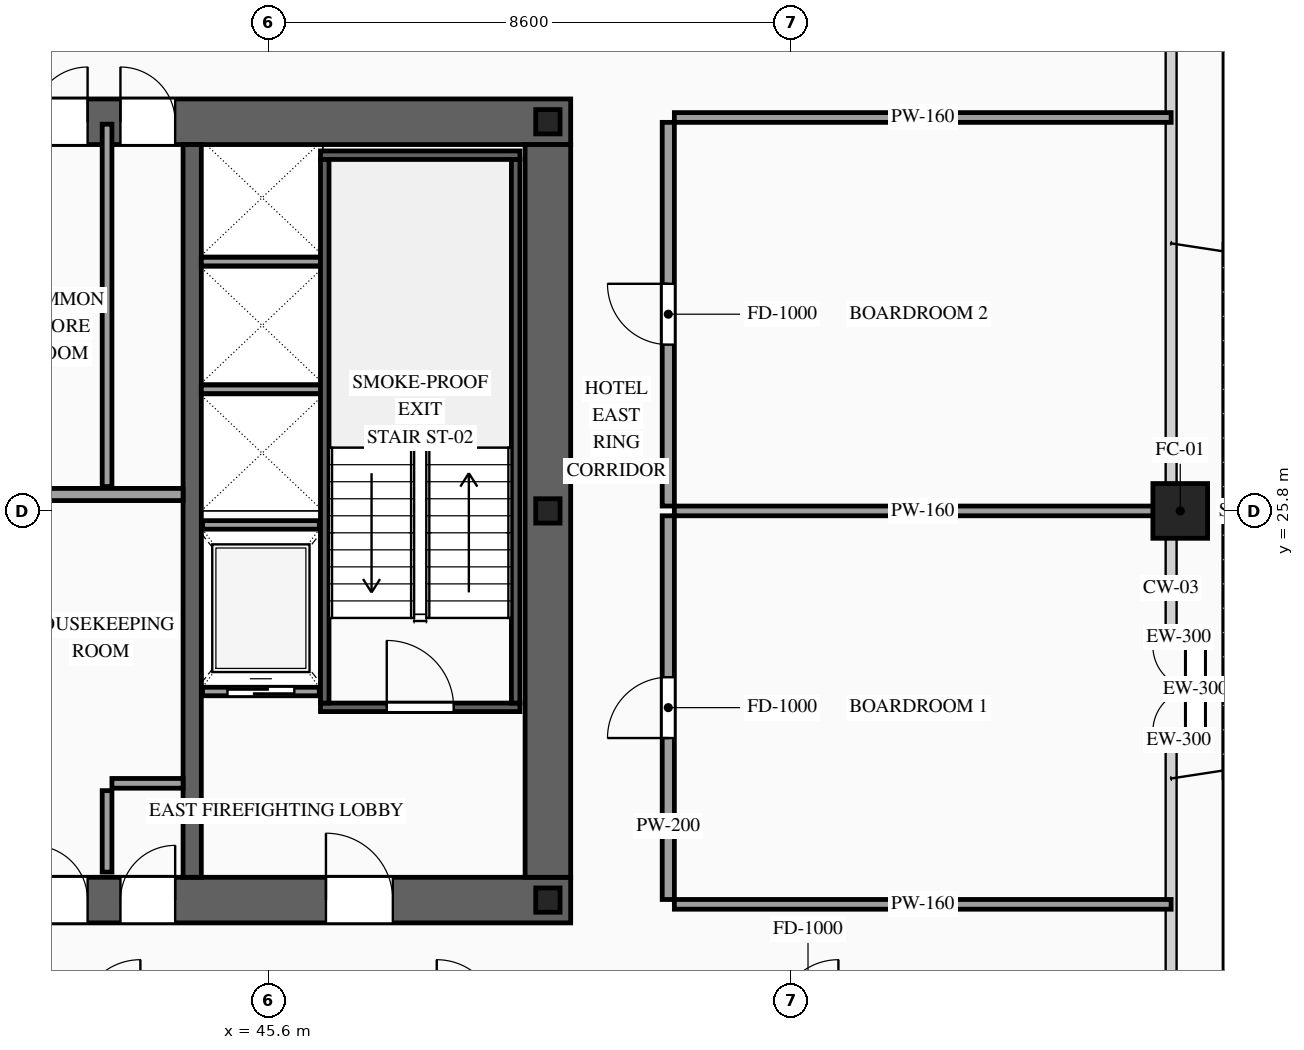
"""IFC4 building model, lengths in metres.
Left out: names, types, materials, properties, quantities, classifications, styles, units other than length and angle.
Written with IfcOpenShell. Run it as: python <this file> out.ifc"""

import sys

from ifc_helpers import new_model, si_unit, direction, frame, frame_2d, origin, origin_2d, place, context, subcontext, project, spatial, rectangle, hollow_rectangle, i_section, extrude, source, transform, mapped, element, fill, save


model = new_model("IFC4")
c1 = context("Model", 3, precision=1e-05, world=origin(), true_north=direction((0.0, 1.0)))
c2 = subcontext(c1, "Body", "Model", "MODEL_VIEW")
j1 = project(units=[si_unit("LENGTHUNIT", "METRE"), si_unit("PLANEANGLEUNIT", "RADIAN")], contexts=[c1])
p1 = place(None, origin())
s1 = spatial("IfcSite", under=j1, at=p1, CompositionType="ELEMENT")
p2 = place(p1, origin())
s2 = spatial("IfcBuilding", under=s1, at=p2, CompositionType="ELEMENT")
p3 = place(p2, frame((0.0, 0.0, 159.6)))
s3 = spatial("IfcBuildingStorey", under=s2, at=p3, CompositionType="ELEMENT", Elevation=159.6)
p4 = place(p3, frame((23.425, 19.4, 0.0), z_axis=(0.0, 0.0, 1.0), x_axis=(1.0, 0.0, 0.0)))
e1 = element("IfcWall", 1, at=p4, inside=s3, PredefinedType="SHEAR", context=c2, shape_type="SweptSolid", body=[
    extrude(rectangle(XDim=27.15, YDim=0.75, at=frame_2d((13.575, 0.0))), origin(), (0.0, 0.0, 1.0), 3.6),
])
p5 = place(p4, frame((2.025, 0.0, 0.0)))
e2 = element("IfcOpeningElement", 2, at=p5, cuts=e1, PredefinedType="OPENING", context=c2, shape_type="SweptSolid", body=[
    extrude(rectangle(XDim=1.1, YDim=2.2, at=frame_2d((0.55, 1.1))), frame((0.0, 0.39, 0.0), z_axis=(0.0, -1.0, 0.0), x_axis=(1.0, 0.0, 0.0)), (0.0, 0.0, 1.0), 0.78),
])
p6 = place(p4, frame((9.925, 0.0, 0.0)))
e3 = element("IfcOpeningElement", 3, at=p6, cuts=e1, PredefinedType="OPENING", context=c2, shape_type="SweptSolid", body=[
    extrude(rectangle(XDim=1.1, YDim=2.2, at=frame_2d((0.55, 1.1))), frame((0.0, 0.39, 0.0), z_axis=(0.0, -1.0, 0.0), x_axis=(1.0, 0.0, 0.0)), (0.0, 0.0, 1.0), 0.78),
])
p7 = place(p4, frame((23.125, 0.0, 0.0)))
e4 = element("IfcOpeningElement", 4, at=p7, cuts=e1, PredefinedType="OPENING", context=c2, shape_type="SweptSolid", body=[
    extrude(rectangle(XDim=1.1, YDim=2.2, at=frame_2d((0.55, 1.1))), frame((0.0, 0.39, 0.0), z_axis=(0.0, -1.0, 0.0), x_axis=(1.0, 0.0, 0.0)), (0.0, 0.0, 1.0), 0.78),
])
p8 = place(p4, frame((19.745, 0.0, 0.0)))
e5 = element("IfcOpeningElement", 5, at=p8, cuts=e1, PredefinedType="OPENING", context=c2, shape_type="SweptSolid", body=[
    extrude(rectangle(XDim=0.9, YDim=2.15, at=frame_2d((0.45, 1.075))), frame((0.0, 0.39, 0.0), z_axis=(0.0, -1.0, 0.0), x_axis=(1.0, 0.0, 0.0)), (0.0, 0.0, 1.0), 0.78),
])
p9 = place(p4, frame((18.305, 0.0, 0.0)))
e6 = element("IfcOpeningElement", 6, at=p9, cuts=e1, PredefinedType="OPENING", context=c2, shape_type="SweptSolid", body=[
    extrude(rectangle(XDim=0.9, YDim=2.15, at=frame_2d((0.45, 1.075))), frame((0.0, 0.39, 0.0), z_axis=(0.0, -1.0, 0.0), x_axis=(1.0, 0.0, 0.0)), (0.0, 0.0, 1.0), 0.78),
])
p10 = place(p3, frame((23.425, 32.2, 0.0), z_axis=(0.0, 0.0, 1.0), x_axis=(1.0, 0.0, 0.0)))
e7 = element("IfcWall", 7, at=p10, inside=s3, PredefinedType="SHEAR", context=c2, shape_type="SweptSolid", body=[
    extrude(rectangle(XDim=27.15, YDim=0.75, at=frame_2d((13.575, 0.0))), origin(), (0.0, 0.0, 1.0), 3.6),
])
p11 = place(p10, frame((4.645, 0.0, 0.0)))
e8 = element("IfcOpeningElement", 8, at=p11, cuts=e7, PredefinedType="OPENING", context=c2, shape_type="SweptSolid", body=[
    extrude(rectangle(XDim=0.9, YDim=2.15, at=frame_2d((0.45, 1.075))), frame((0.0, 0.39, 0.0), z_axis=(0.0, -1.0, 0.0), x_axis=(1.0, 0.0, 0.0)), (0.0, 0.0, 1.0), 0.78),
])
p12 = place(p10, frame((9.925, 0.0, 0.0)))
e9 = element("IfcOpeningElement", 9, at=p12, cuts=e7, PredefinedType="OPENING", context=c2, shape_type="SweptSolid", body=[
    extrude(rectangle(XDim=1.1, YDim=2.2, at=frame_2d((0.55, 1.1))), frame((0.0, 0.39, 0.0), z_axis=(0.0, -1.0, 0.0), x_axis=(1.0, 0.0, 0.0)), (0.0, 0.0, 1.0), 0.78),
])
p13 = place(p10, frame((15.775, 0.0, 0.0)))
e10 = element("IfcOpeningElement", 10, at=p13, cuts=e7, PredefinedType="OPENING", context=c2, shape_type="SweptSolid", body=[
    extrude(rectangle(XDim=1.1, YDim=2.2, at=frame_2d((0.55, 1.1))), frame((0.0, 0.39, 0.0), z_axis=(0.0, -1.0, 0.0), x_axis=(1.0, 0.0, 0.0)), (0.0, 0.0, 1.0), 0.78),
])
p14 = place(p10, frame((18.305, 0.0, 0.0)))
e11 = element("IfcOpeningElement", 11, at=p14, cuts=e7, PredefinedType="OPENING", context=c2, shape_type="SweptSolid", body=[
    extrude(rectangle(XDim=0.9, YDim=2.15, at=frame_2d((0.45, 1.075))), frame((0.0, 0.39, 0.0), z_axis=(0.0, -1.0, 0.0), x_axis=(1.0, 0.0, 0.0)), (0.0, 0.0, 1.0), 0.78),
])
p15 = place(p10, frame((19.745, 0.0, 0.0)))
e12 = element("IfcOpeningElement", 12, at=p15, cuts=e7, PredefinedType="OPENING", context=c2, shape_type="SweptSolid", body=[
    extrude(rectangle(XDim=0.9, YDim=2.15, at=frame_2d((0.45, 1.075))), frame((0.0, 0.39, 0.0), z_axis=(0.0, -1.0, 0.0), x_axis=(1.0, 0.0, 0.0)), (0.0, 0.0, 1.0), 0.78),
])
m1 = source(origin(), c2, "Body", "SweptSolid", [
    extrude(rectangle(XDim=12.05, YDim=0.75, at=frame_2d((6.025, 0.0))), origin(), (0.0, 0.0, 1.0), 3.6),
])
p16 = place(p3, frame((50.2, 19.775, 0.0), z_axis=(0.0, 0.0, 1.0), x_axis=(0.0, 1.0, 0.0)))
e13 = element("IfcWall", 13, at=p16, inside=s3, PredefinedType="SHEAR", context=c2, shape_type="MappedRepresentation", body=[
    mapped(m1, transform((0.0, 0.0, 0.0), scale=1.0)),
])
m2 = source(origin(), c2, "Body", "SweptSolid", [
    extrude(rectangle(XDim=12.05, YDim=0.3, at=frame_2d((6.025, 0.0))), origin(), (0.0, 0.0, 1.0), 3.6),
])
p17 = place(p3, frame((44.35, 19.775, 0.0), z_axis=(0.0, 0.0, 1.0), x_axis=(0.0, 1.0, 0.0)))
e14 = element("IfcWall", 14, at=p17, inside=s3, PredefinedType="SOLIDWALL", context=c2, shape_type="MappedRepresentation", body=[
    mapped(m2, transform((0.0, 0.0, 0.0), scale=1.0)),
])
m3 = source(origin(), c2, "Body", "SweptSolid", [
    extrude(i_section(OverallWidth=0.4, OverallDepth=0.4, WebThickness=0.013, FlangeThickness=0.021, at=origin_2d()), origin(), (0.0, 0.0, 1.0), 3.6),
])
for number, where, z_axis, x_axis in (
    (15, (50.2, 19.4, 0.0), (0.0, 0.0, 1.0), (1.0, 0.0, 0.0)),
    (16, (50.2, 25.8, 0.0), (0.0, 0.0, 1.0), (1.0, 0.0, 0.0)),
    (17, (50.2, 32.2, 0.0), (0.0, 0.0, 1.0), (1.0, 0.0, 0.0)),
):
    element("IfcColumn", number, at=place(p3, frame(where, z_axis=z_axis, x_axis=x_axis)), inside=s3, PredefinedType="COLUMN", context=c2, shape_type="MappedRepresentation", body=[
        mapped(m3, transform((0.0, 0.0, 0.0), scale=1.0)),
    ])
m4 = source(origin(), c2, "Body", "SweptSolid", [
    extrude(hollow_rectangle(XDim=0.9, YDim=0.9, WallThickness=0.042, at=origin_2d()), origin(), (0.0, 0.0, 1.0), 3.6),
])
p18 = place(p3, frame((60.6, 25.8, 0.0), z_axis=(0.0, 0.0, 1.0), x_axis=(1.0, 0.0, 0.0)))
e18 = element("IfcColumn", 18, at=p18, inside=s3, PredefinedType="COLUMN", context=c2, shape_type="MappedRepresentation", body=[
    mapped(m4, transform((0.0, 0.0, 0.0), scale=1.0)),
])
p19 = place(p3, frame((60.85, 21.875, 0.0), z_axis=(0.0, 0.0, 1.0), x_axis=(0.0, 1.0, 0.0)))
e19 = element("IfcWall", 19, at=p19, inside=s3, PredefinedType="SOLIDWALL", context=c2, shape_type="SweptSolid", body=[
    extrude(rectangle(XDim=2.0, YDim=0.3, at=frame_2d((1.0, 0.0))), origin(), (0.0, 0.0, 1.0), 3.38),
])
p20 = place(p19, frame((0.3, 0.0, 0.0)))
e20 = element("IfcOpeningElement", 20, at=p20, cuts=e19, PredefinedType="OPENING", context=c2, shape_type="SweptSolid", body=[
    extrude(rectangle(XDim=1.4, YDim=2.3, at=frame_2d((0.7, 1.15))), frame((0.0, 0.165, 0.0), z_axis=(0.0, -1.0, 0.0), x_axis=(1.0, 0.0, 0.0)), (0.0, 0.0, 1.0), 0.33),
])
m5 = source(origin(), c2, "Body", "SweptSolid", [
    extrude(rectangle(XDim=0.25, YDim=0.3, at=frame_2d((0.125, 0.0))), origin(), (0.0, 0.0, 1.0), 3.38),
])
for number, where, z_axis, x_axis in (
    (21, (60.45, 22.025, 0.0), (0.0, 0.0, 1.0), (1.0, 0.0, 0.0)),
    (22, (60.7, 23.725, 0.0), (0.0, 0.0, 1.0), (-1.0, 0.0, 0.0)),
):
    element("IfcWall", number, at=place(p3, frame(where, z_axis=z_axis, x_axis=x_axis)), inside=s3, PredefinedType="SOLIDWALL", context=c2, shape_type="MappedRepresentation", body=[
        mapped(m5, transform((0.0, 0.0, 0.0), scale=1.0)),
    ])
p21 = place(p3, frame((44.52, 22.83, 0.0), z_axis=(0.0, 0.0, 1.0), x_axis=(1.0, 0.0, 0.0)))
e23 = element("IfcWall", 23, at=p21, inside=s3, PredefinedType="SOLIDWALL", context=c2, shape_type="SweptSolid", body=[
    extrude(rectangle(XDim=1.92, YDim=0.14, at=frame_2d((0.96, 0.0))), origin(), (0.0, 0.0, 1.0), 3.38),
])
p22 = place(p21, frame((0.41, 0.0, 0.0)))
e24 = element("IfcOpeningElement", 24, at=p22, cuts=e23, PredefinedType="OPENING", context=c2, shape_type="SweptSolid", body=[
    extrude(rectangle(XDim=1.1, YDim=2.2, at=frame_2d((0.55, 1.1))), frame((0.0, 0.085, 0.0), z_axis=(0.0, -1.0, 0.0), x_axis=(1.0, 0.0, 0.0)), (0.0, 0.0, 1.0), 0.17),
])
m6 = source(origin(), c2, "Body", "SweptSolid", [
    extrude(rectangle(XDim=1.92, YDim=0.14, at=frame_2d((0.96, 0.0))), origin(), (0.0, 0.0, 1.0), 3.38),
])
p23 = place(p3, frame((44.52, 25.57, 0.0), z_axis=(0.0, 0.0, 1.0), x_axis=(1.0, 0.0, 0.0)))
e25 = element("IfcWall", 25, at=p23, inside=s3, PredefinedType="SOLIDWALL", context=c2, shape_type="MappedRepresentation", body=[
    mapped(m6, transform((0.0, 0.0, 0.0), scale=1.0)),
])
m7 = source(origin(), c2, "Body", "SweptSolid", [
    extrude(rectangle(XDim=2.0, YDim=0.14, at=frame_2d((1.0, 0.0))), origin(), (0.0, 0.0, 1.0), 3.38),
])
for number, where, z_axis, x_axis in (
    (26, (44.5, 27.8, 0.0), (0.0, 0.0, 1.0), (1.0, 0.0, 0.0)),
    (27, (44.5, 29.9, 0.0), (0.0, 0.0, 1.0), (1.0, 0.0, 0.0)),
):
    element("IfcWall", number, at=place(p3, frame(where, z_axis=z_axis, x_axis=x_axis)), inside=s3, PredefinedType="SOLIDWALL", context=c2, shape_type="MappedRepresentation", body=[
        mapped(m7, transform((0.0, 0.0, 0.0), scale=1.0)),
    ])
p24 = place(p3, frame((46.46, 22.57, 0.0), z_axis=(0.0, 0.0, 1.0), x_axis=(1.0, 0.0, 0.0)))
e28 = element("IfcWall", 28, at=p24, inside=s3, PredefinedType="SOLIDWALL", context=c2, shape_type="SweptSolid", body=[
    extrude(rectangle(XDim=3.28, YDim=0.14, at=frame_2d((1.64, 0.0))), origin(), (0.0, 0.0, 1.0), 3.38),
])
p25 = place(p24, frame((1.09, 0.0, 0.0)))
e29 = element("IfcOpeningElement", 29, at=p25, cuts=e28, PredefinedType="OPENING", context=c2, shape_type="SweptSolid", body=[
    extrude(rectangle(XDim=1.1, YDim=2.2, at=frame_2d((0.55, 1.1))), frame((0.0, 0.085, 0.0), z_axis=(0.0, -1.0, 0.0), x_axis=(1.0, 0.0, 0.0)), (0.0, 0.0, 1.0), 0.17),
])
m8 = source(origin(), c2, "Body", "SweptSolid", [
    extrude(rectangle(XDim=3.28, YDim=0.14, at=frame_2d((1.64, 0.0))), origin(), (0.0, 0.0, 1.0), 3.38),
])
p26 = place(p3, frame((46.46, 31.65, 0.0), z_axis=(0.0, 0.0, 1.0), x_axis=(1.0, 0.0, 0.0)))
e30 = element("IfcWall", 30, at=p26, inside=s3, PredefinedType="SOLIDWALL", context=c2, shape_type="MappedRepresentation", body=[
    mapped(m8, transform((0.0, 0.0, 0.0), scale=1.0)),
])
m9 = source(origin(), c2, "Body", "SweptSolid", [
    extrude(rectangle(XDim=8.94, YDim=0.14, at=frame_2d((4.47, 0.0))), origin(), (0.0, 0.0, 1.0), 3.38),
])
for number, where, z_axis, x_axis in (
    (31, (46.53, 22.64, 0.0), (0.0, 0.0, 1.0), (0.0, 1.0, 0.0)),
    (32, (49.67, 22.64, 0.0), (0.0, 0.0, 1.0), (0.0, 1.0, 0.0)),
):
    element("IfcWall", number, at=place(p3, frame(where, z_axis=z_axis, x_axis=x_axis)), inside=s3, PredefinedType="SOLIDWALL", context=c2, shape_type="MappedRepresentation", body=[
        mapped(m9, transform((0.0, 0.0, 0.0), scale=1.0)),
    ])
m10 = source(origin(), c2, "Body", "SweptSolid", [
    extrude(rectangle(XDim=1.34, YDim=0.16, at=frame_2d((0.67, 0.0))), origin(), (0.0, 0.0, 1.0), 3.38),
])
p27 = place(p3, frame((42.95, 19.86, 0.0), z_axis=(0.0, 0.0, 1.0), x_axis=(0.0, 1.0, 0.0)))
e33 = element("IfcWall", 33, at=p27, inside=s3, PredefinedType="PARTITIONING", context=c2, shape_type="MappedRepresentation", body=[
    mapped(m10, transform((0.0, 0.0, 0.0), scale=1.0)),
])
m11 = source(origin(), c2, "Body", "SweptSolid", [
    extrude(rectangle(XDim=1.17, YDim=0.16, at=frame_2d((0.585, 0.0))), origin(), (0.0, 0.0, 1.0), 3.38),
])
p28 = place(p3, frame((43.03, 21.32, 0.0), z_axis=(0.0, 0.0, 1.0), x_axis=(1.0, 0.0, 0.0)))
e34 = element("IfcWall", 34, at=p28, inside=s3, PredefinedType="PARTITIONING", context=c2, shape_type="MappedRepresentation", body=[
    mapped(m11, transform((0.0, 0.0, 0.0), scale=1.0)),
])
m12 = source(origin(), c2, "Body", "SweptSolid", [
    extrude(rectangle(XDim=2.7, YDim=0.2, at=frame_2d((1.35, 0.0))), origin(), (0.0, 0.0, 1.0), 3.38),
])
p29 = place(p3, frame((41.5, 26.07, 0.0), z_axis=(0.0, 0.0, 1.0), x_axis=(1.0, 0.0, 0.0)))
e35 = element("IfcWall", 35, at=p29, inside=s3, PredefinedType="PARTITIONING", context=c2, shape_type="MappedRepresentation", body=[
    mapped(m12, transform((0.0, 0.0, 0.0), scale=1.0)),
])
m13 = source(origin(), c2, "Body", "SweptSolid", [
    extrude(rectangle(XDim=5.96, YDim=0.16, at=frame_2d((2.98, 0.0))), origin(), (0.0, 0.0, 1.0), 3.38),
])
p30 = place(p3, frame((42.95, 26.2, 0.0), z_axis=(0.0, 0.0, 1.0), x_axis=(0.0, 1.0, 0.0)))
e36 = element("IfcWall", 36, at=p30, inside=s3, PredefinedType="PARTITIONING", context=c2, shape_type="MappedRepresentation", body=[
    mapped(m13, transform((0.0, 0.0, 0.0), scale=1.0)),
])
p31 = place(p3, frame((52.18, 19.41, 0.0), z_axis=(0.0, 0.0, 1.0), x_axis=(0.0, 1.0, 0.0)))
e37 = element("IfcWall", 37, at=p31, inside=s3, PredefinedType="PARTITIONING", context=c2, shape_type="SweptSolid", body=[
    extrude(rectangle(XDim=6.31, YDim=0.2, at=frame_2d((3.155, 0.0))), origin(), (0.0, 0.0, 1.0), 3.38),
])
p32 = place(p31, frame((2.655, 0.0, 0.0)))
e38 = element("IfcOpeningElement", 38, at=p32, cuts=e37, PredefinedType="OPENING", context=c2, shape_type="SweptSolid", body=[
    extrude(rectangle(XDim=1.0, YDim=2.2, at=frame_2d((0.5, 1.1))), frame((0.0, 0.115, 0.0), z_axis=(0.0, -1.0, 0.0), x_axis=(1.0, 0.0, 0.0)), (0.0, 0.0, 1.0), 0.23),
])
m14 = source(origin(), c2, "Body", "SweptSolid", [
    extrude(rectangle(XDim=8.17, YDim=0.16, at=frame_2d((4.085, 0.0))), origin(), (0.0, 0.0, 1.0), 2.675),
])
p33 = place(p3, frame((52.28, 25.8, 0.0), z_axis=(0.0, 0.0, 1.0), x_axis=(1.0, 0.0, 0.0)))
e39 = element("IfcWall", 39, at=p33, inside=s3, PredefinedType="PARTITIONING", context=c2, shape_type="MappedRepresentation", body=[
    mapped(m14, transform((0.0, 0.0, 0.0), scale=1.0)),
])
m15 = source(origin(), c2, "Body", "SweptSolid", [
    extrude(rectangle(XDim=8.17, YDim=0.16, at=frame_2d((4.085, 0.0))), origin(), (0.0, 0.0, 1.0), 2.875),
])
p34 = place(p3, frame((52.28, 19.33, 0.0), z_axis=(0.0, 0.0, 1.0), x_axis=(1.0, 0.0, 0.0)))
e40 = element("IfcWall", 40, at=p34, inside=s3, PredefinedType="PARTITIONING", context=c2, shape_type="MappedRepresentation", body=[
    mapped(m15, transform((0.0, 0.0, 0.0), scale=1.0)),
])
p35 = place(p3, frame((52.18, 25.88, 0.0), z_axis=(0.0, 0.0, 1.0), x_axis=(0.0, 1.0, 0.0)))
e41 = element("IfcWall", 41, at=p35, inside=s3, PredefinedType="PARTITIONING", context=c2, shape_type="SweptSolid", body=[
    extrude(rectangle(XDim=6.31, YDim=0.2, at=frame_2d((3.155, 0.0))), origin(), (0.0, 0.0, 1.0), 3.38),
])
p36 = place(p35, frame((2.655, 0.0, 0.0)))
e42 = element("IfcOpeningElement", 42, at=p36, cuts=e41, PredefinedType="OPENING", context=c2, shape_type="SweptSolid", body=[
    extrude(rectangle(XDim=1.0, YDim=2.2, at=frame_2d((0.5, 1.1))), frame((0.0, 0.115, 0.0), z_axis=(0.0, -1.0, 0.0), x_axis=(1.0, 0.0, 0.0)), (0.0, 0.0, 1.0), 0.23),
])
p37 = place(p3, frame((52.28, 32.27, 0.0), z_axis=(0.0, 0.0, 1.0), x_axis=(1.0, 0.0, 0.0)))
e43 = element("IfcWall", 43, at=p37, inside=s3, PredefinedType="PARTITIONING", context=c2, shape_type="MappedRepresentation", body=[
    mapped(m15, transform((0.0, 0.0, 0.0), scale=1.0)),
])
m16 = source(origin(), c2, "Body", "SweptSolid", [
    extrude(rectangle(XDim=1.4, YDim=2.3, at=frame_2d((0.7, 1.15))), frame((0.0, 0.025, 0.0), z_axis=(0.0, -1.0, 0.0), x_axis=(1.0, 0.0, 0.0)), (0.0, 0.0, 1.0), 0.05),
])
p38 = place(p20, origin())
e44 = element("IfcDoor", 44, at=p38, inside=s3, OperationType="DOUBLE_DOOR_SINGLE_SWING", PredefinedType="DOOR", context=c2, shape_type="MappedRepresentation", body=[
    mapped(m16, transform((0.0, 0.0, 0.0), scale=1.0)),
])
fill(e20, e44)
m17 = source(origin(), c2, "Body", "SweptSolid", [
    extrude(rectangle(XDim=1.1, YDim=2.2, at=frame_2d((0.55, 1.1))), frame((0.0, 0.025, 0.0), z_axis=(0.0, -1.0, 0.0), x_axis=(1.0, 0.0, 0.0)), (0.0, 0.0, 1.0), 0.05),
])
p39 = place(p22, origin())
e45 = element("IfcDoor", 45, at=p39, inside=s3, OperationType="SLIDING_TO_RIGHT", PredefinedType="DOOR", context=c2, shape_type="MappedRepresentation", body=[
    mapped(m17, transform((0.0, 0.0, 0.0), scale=1.0)),
])
fill(e24, e45)
m18 = source(origin(), c2, "Body", "SweptSolid", [
    extrude(rectangle(XDim=1.1, YDim=2.2, at=frame_2d((0.55, 1.1))), frame((0.0, 0.025, 0.0), z_axis=(0.0, -1.0, 0.0), x_axis=(1.0, 0.0, 0.0)), (0.0, 0.0, 1.0), 0.05),
])
p40 = place(p25, origin())
e46 = element("IfcDoor", 46, at=p40, inside=s3, OperationType="SINGLE_SWING_LEFT", PredefinedType="DOOR", context=c2, shape_type="MappedRepresentation", body=[
    mapped(m18, transform((0.0, 0.0, 0.0), scale=1.0)),
])
fill(e29, e46)
p41 = place(p7, origin())
e47 = element("IfcDoor", 47, at=p41, inside=s3, OperationType="SINGLE_SWING_LEFT", PredefinedType="DOOR", context=c2, shape_type="MappedRepresentation", body=[
    mapped(m18, transform((0.0, 0.0, 0.0), scale=1.0)),
])
fill(e4, e47)
m19 = source(origin(), c2, "Body", "SweptSolid", [
    extrude(rectangle(XDim=0.9, YDim=2.15, at=frame_2d((0.45, 1.075))), frame((0.0, 0.025, 0.0), z_axis=(0.0, -1.0, 0.0), x_axis=(1.0, 0.0, 0.0)), (0.0, 0.0, 1.0), 0.05),
])
p42 = place(p8, origin())
e48 = element("IfcDoor", 48, at=p42, inside=s3, OperationType="SINGLE_SWING_RIGHT", PredefinedType="DOOR", context=c2, shape_type="MappedRepresentation", body=[
    mapped(m19, transform((0.0, 0.0, 0.0), scale=1.0)),
])
fill(e5, e48)
p43 = place(p9, origin())
e49 = element("IfcDoor", 49, at=p43, inside=s3, OperationType="SINGLE_SWING_LEFT", PredefinedType="DOOR", context=c2, shape_type="MappedRepresentation", body=[
    mapped(m19, transform((0.0, 0.0, 0.0), scale=1.0)),
])
fill(e6, e49)
p44 = place(p14, origin())
e50 = element("IfcDoor", 50, at=p44, inside=s3, OperationType="SINGLE_SWING_RIGHT", PredefinedType="DOOR", context=c2, shape_type="MappedRepresentation", body=[
    mapped(m19, transform((0.0, 0.0, 0.0), scale=1.0)),
])
fill(e11, e50)
p45 = place(p15, origin())
e51 = element("IfcDoor", 51, at=p45, inside=s3, OperationType="SINGLE_SWING_LEFT", PredefinedType="DOOR", context=c2, shape_type="MappedRepresentation", body=[
    mapped(m19, transform((0.0, 0.0, 0.0), scale=1.0)),
])
fill(e12, e51)
m20 = source(origin(), c2, "Body", "SweptSolid", [
    extrude(rectangle(XDim=1.0, YDim=2.2, at=frame_2d((0.5, 1.1))), frame((0.0, 0.025, 0.0), z_axis=(0.0, -1.0, 0.0), x_axis=(1.0, 0.0, 0.0)), (0.0, 0.0, 1.0), 0.05),
])
p46 = place(p32, origin())
e52 = element("IfcDoor", 52, at=p46, inside=s3, OperationType="SINGLE_SWING_LEFT", PredefinedType="DOOR", context=c2, shape_type="MappedRepresentation", body=[
    mapped(m20, transform((0.0, 0.0, 0.0), scale=1.0)),
])
fill(e38, e52)
p47 = place(p36, origin())
e53 = element("IfcDoor", 53, at=p47, inside=s3, OperationType="SINGLE_SWING_RIGHT", PredefinedType="DOOR", context=c2, shape_type="MappedRepresentation", body=[
    mapped(m20, transform((0.0, 0.0, 0.0), scale=1.0)),
])
fill(e42, e53)
save(model, sys.argv[1])
